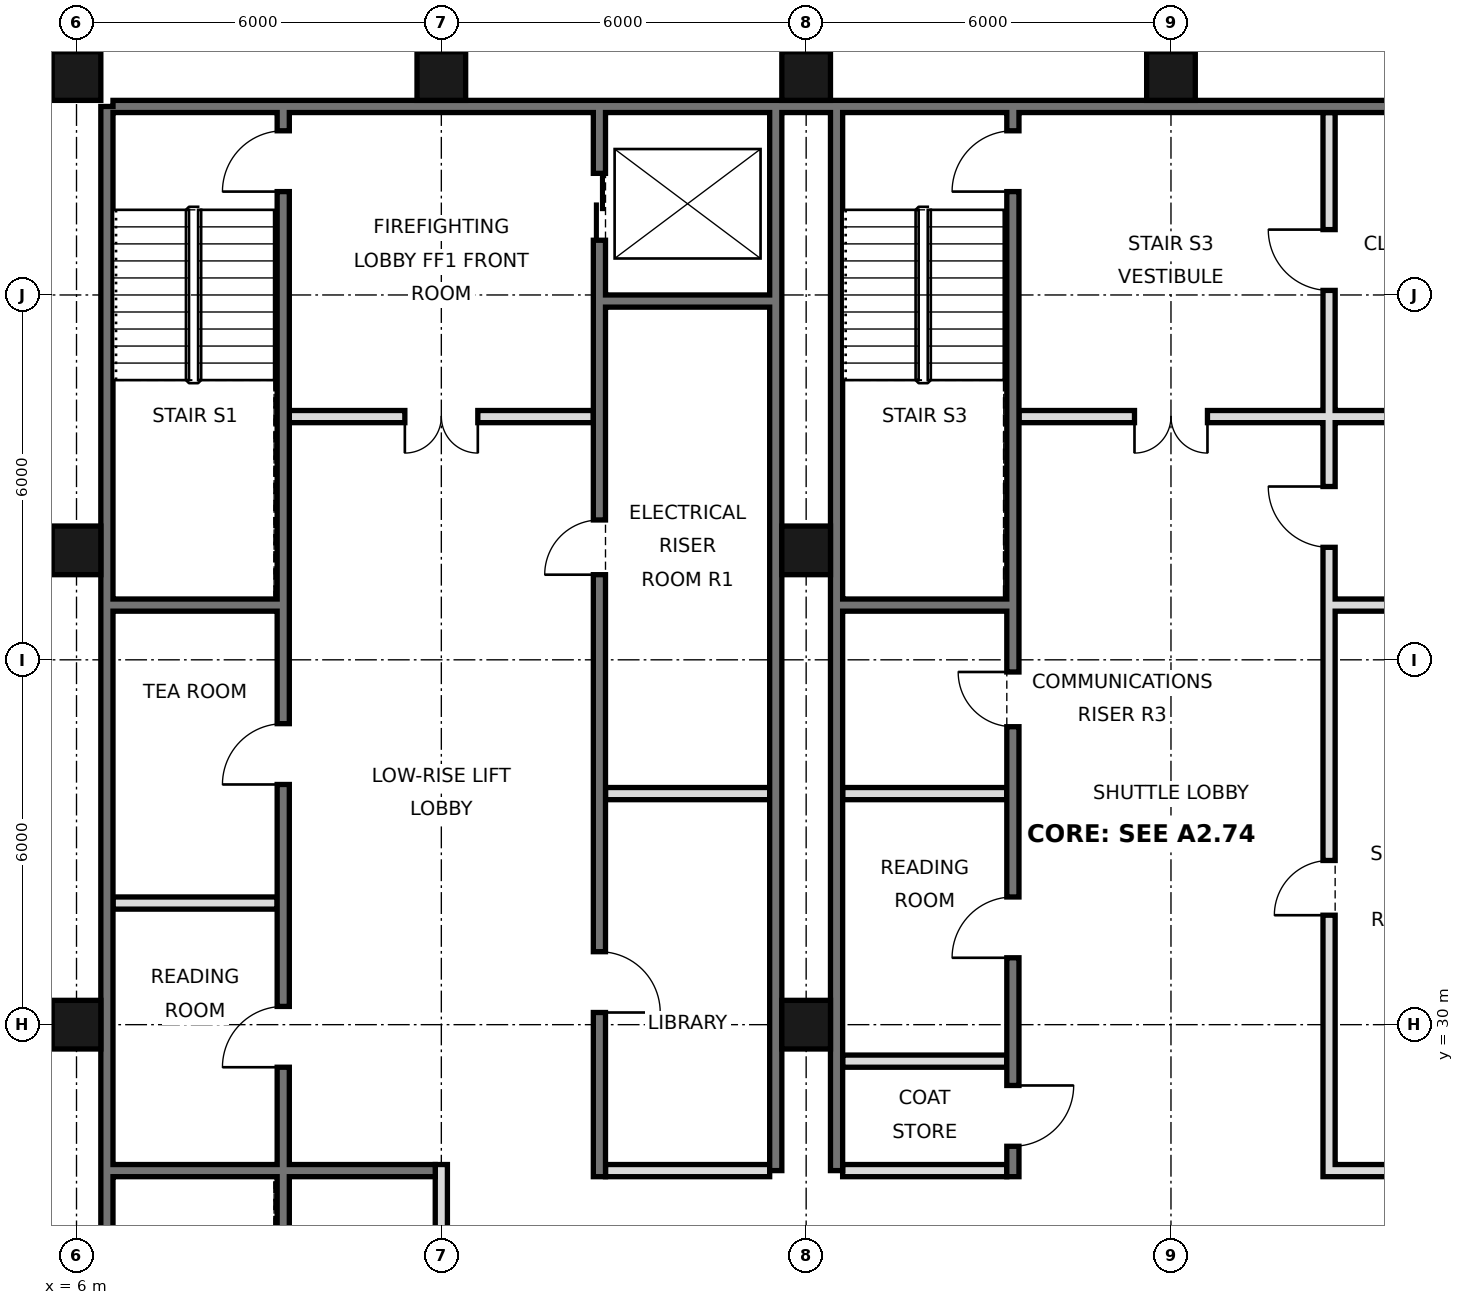
"""IFC4 building model, lengths in metres.
Left out: names, types, materials, properties, quantities, classifications, styles, units other than length and angle.
Written with IfcOpenShell. Run it as: python <this file> out.ifc"""

import sys

from ifc_helpers import new_model, si_unit, direction, frame, frame_2d, origin, origin_2d, place, context, subcontext, project, spatial, rectangle, hollow_rectangle, extrude, element, fill, save


model = new_model("IFC4")
c1 = context("Model", 3, precision=1e-05, world=origin(), true_north=direction((0.0, 1.0)))
c2 = subcontext(c1, "Body", "Model", "MODEL_VIEW")
j1 = project(units=[si_unit("LENGTHUNIT", "METRE"), si_unit("PLANEANGLEUNIT", "RADIAN")], contexts=[c1])
p1 = place(None, origin())
s1 = spatial("IfcSite", under=j1, at=p1, CompositionType="ELEMENT")
p2 = place(p1, origin())
s2 = spatial("IfcBuilding", under=s1, at=p2, CompositionType="ELEMENT")
p3 = place(p2, frame((0.0, 0.0, 298.0)))
s3 = spatial("IfcBuildingStorey", under=s2, at=p3, CompositionType="ELEMENT", Elevation=298.0)
for number, where, z_axis, x_axis in (
    (1, (6.0, 30.0, 0.0), (0.0, 0.0, 1.0), (1.0, 0.0, 0.0)),
    (2, (6.0, 37.8, 0.0), (0.0, 0.0, 1.0), (1.0, 0.0, 0.0)),
    (3, (6.0, 45.6, 0.0), (0.0, 0.0, 1.0), (1.0, 0.0, 0.0)),
    (4, (12.0, 45.6, 0.0), (0.0, 0.0, 1.0), (1.0, 0.0, 0.0)),
    (5, (18.0, 30.0, 0.0), (0.0, 0.0, 1.0), (1.0, 0.0, 0.0)),
    (6, (18.0, 37.8, 0.0), (0.0, 0.0, 1.0), (1.0, 0.0, 0.0)),
    (7, (18.0, 45.6, 0.0), (0.0, 0.0, 1.0), (1.0, 0.0, 0.0)),
    (8, (24.0, 45.6, 0.0), (0.0, 0.0, 1.0), (1.0, 0.0, 0.0)),
):
    element("IfcColumn", number, at=place(p3, frame(where, z_axis=z_axis, x_axis=x_axis)), inside=s3, PredefinedType="COLUMN", context=c2, shape_type="SweptSolid", body=[
        extrude(hollow_rectangle(XDim=0.8, YDim=0.8, WallThickness=0.032, at=origin_2d()), origin(), (0.0, 0.0, 1.0), 3.6),
    ])
p4 = place(p3, frame((6.5, 21.6, 0.0), z_axis=(0.0, 0.0, 1.0), x_axis=(0.0, 1.0, 0.0)))
e9 = element("IfcWall", 9, at=p4, inside=s3, PredefinedType="SOLIDWALL", context=c2, shape_type="SweptSolid", body=[
    extrude(rectangle(XDim=23.5, YDim=0.2, at=frame_2d((11.75, 0.0))), origin(), (0.0, 0.0, 1.0), 3.42),
])
p5 = place(p3, frame((6.6, 45.1, 0.0), z_axis=(0.0, 0.0, 1.0), x_axis=(1.0, 0.0, 0.0)))
e10 = element("IfcWall", 10, at=p5, inside=s3, PredefinedType="SOLIDWALL", context=c2, shape_type="SweptSolid", body=[
    extrude(rectangle(XDim=34.8, YDim=0.2, at=frame_2d((17.4, 0.0))), origin(), (0.0, 0.0, 1.0), 3.42),
])
for number, where, z_axis, x_axis in (
    (11, (17.5, 27.6, 0.0), (0.0, 0.0, 1.0), (0.0, 1.0, 0.0)),
    (12, (18.5, 27.6, 0.0), (0.0, 0.0, 1.0), (0.0, 1.0, 0.0)),
):
    element("IfcWall", number, at=place(p3, frame(where, z_axis=z_axis, x_axis=x_axis)), inside=s3, PredefinedType="SOLIDWALL", context=c2, shape_type="SweptSolid", body=[
        extrude(rectangle(XDim=17.5, YDim=0.2, at=frame_2d((8.75, 0.0))), origin(), (0.0, 0.0, 1.0), 3.42),
    ])
p6 = place(p3, frame((12.0, 21.6, 0.0), z_axis=(0.0, 0.0, 1.0), x_axis=(0.0, 1.0, 0.0)))
e13 = element("IfcWall", 13, at=p6, inside=s3, PredefinedType="PARTITIONING", context=c2, shape_type="SweptSolid", body=[
    extrude(rectangle(XDim=6.1, YDim=0.2, at=frame_2d((3.05, 0.0))), origin(), (0.0, 0.0, 1.0), 3.42),
])
p7 = place(p3, frame((14.6, 27.5, 0.0), z_axis=(0.0, 0.0, 1.0), x_axis=(0.0, 1.0, 0.0)))
e14 = element("IfcWall", 14, at=p7, inside=s3, PredefinedType="SOLIDWALL", context=c2, shape_type="SweptSolid", body=[
    extrude(rectangle(XDim=17.5, YDim=0.2, at=frame_2d((8.75, 0.0))), origin(), (0.0, 0.0, 1.0), 3.42),
])
p8 = place(p7, frame((15.4, 0.0, 0.0)))
e15 = element("IfcOpeningElement", 15, at=p8, cuts=e14, PredefinedType="OPENING", context=c2, shape_type="SweptSolid", body=[
    extrude(rectangle(XDim=1.1, YDim=2.1, at=frame_2d((0.55, 1.05))), frame((0.0, 0.11, 0.0), z_axis=(0.0, -1.0, 0.0), x_axis=(1.0, 0.0, 0.0)), (0.0, 0.0, 1.0), 0.22),
])
p9 = place(p7, frame((2.7, 0.0, 0.0)))
e16 = element("IfcOpeningElement", 16, at=p9, cuts=e14, PredefinedType="OPENING", context=c2, shape_type="SweptSolid", body=[
    extrude(rectangle(XDim=1.0, YDim=2.1, at=frame_2d((0.5, 1.05))), frame((0.0, 0.11, 0.0), z_axis=(0.0, -1.0, 0.0), x_axis=(1.0, 0.0, 0.0)), (0.0, 0.0, 1.0), 0.22),
])
p10 = place(p7, frame((9.9, 0.0, 0.0)))
e17 = element("IfcOpeningElement", 17, at=p10, cuts=e14, PredefinedType="OPENING", context=c2, shape_type="SweptSolid", body=[
    extrude(rectangle(XDim=0.9, YDim=2.1, at=frame_2d((0.45, 1.05))), frame((0.0, 0.11, 0.0), z_axis=(0.0, -1.0, 0.0), x_axis=(1.0, 0.0, 0.0)), (0.0, 0.0, 1.0), 0.22),
])
p11 = place(p3, frame((21.4, 27.5, 0.0), z_axis=(0.0, 0.0, 1.0), x_axis=(0.0, 1.0, 0.0)))
e18 = element("IfcWall", 18, at=p11, inside=s3, PredefinedType="SOLIDWALL", context=c2, shape_type="SweptSolid", body=[
    extrude(rectangle(XDim=17.5, YDim=0.2, at=frame_2d((8.75, 0.0))), origin(), (0.0, 0.0, 1.0), 3.42),
])
p12 = place(p11, frame((0.5, 0.0, 0.0)))
e19 = element("IfcOpeningElement", 19, at=p12, cuts=e18, PredefinedType="OPENING", context=c2, shape_type="SweptSolid", body=[
    extrude(rectangle(XDim=1.0, YDim=2.1, at=frame_2d((0.5, 1.05))), frame((0.0, 0.11, 0.0), z_axis=(0.0, -1.0, 0.0), x_axis=(1.0, 0.0, 0.0)), (0.0, 0.0, 1.0), 0.22),
])
p13 = place(p11, frame((3.6, 0.0, 0.0)))
e20 = element("IfcOpeningElement", 20, at=p13, cuts=e18, PredefinedType="OPENING", context=c2, shape_type="SweptSolid", body=[
    extrude(rectangle(XDim=1.0, YDim=2.1, at=frame_2d((0.5, 1.05))), frame((0.0, 0.11, 0.0), z_axis=(0.0, -1.0, 0.0), x_axis=(1.0, 0.0, 0.0)), (0.0, 0.0, 1.0), 0.22),
])
p14 = place(p11, frame((16.2, 0.0, 0.0)))
e21 = element("IfcOpeningElement", 21, at=p14, cuts=e18, PredefinedType="OPENING", context=c2, shape_type="SweptSolid", body=[
    extrude(rectangle(XDim=1.0, YDim=2.1, at=frame_2d((0.5, 1.05))), frame((0.0, 0.11, 0.0), z_axis=(0.0, -1.0, 0.0), x_axis=(1.0, 0.0, 0.0)), (0.0, 0.0, 1.0), 0.22),
])
p15 = place(p11, frame((7.4, 0.0, 0.0)))
e22 = element("IfcOpeningElement", 22, at=p15, cuts=e18, PredefinedType="OPENING", context=c2, shape_type="SweptSolid", body=[
    extrude(rectangle(XDim=0.9, YDim=2.1, at=frame_2d((0.45, 1.05))), frame((0.0, 0.11, 0.0), z_axis=(0.0, -1.0, 0.0), x_axis=(1.0, 0.0, 0.0)), (0.0, 0.0, 1.0), 0.22),
])
p16 = place(p3, frame((26.6, 27.5, 0.0), z_axis=(0.0, 0.0, 1.0), x_axis=(0.0, 1.0, 0.0)))
e23 = element("IfcWall", 23, at=p16, inside=s3, PredefinedType="SOLIDWALL", context=c2, shape_type="SweptSolid", body=[
    extrude(rectangle(XDim=17.5, YDim=0.2, at=frame_2d((8.75, 0.0))), origin(), (0.0, 0.0, 1.0), 3.42),
])
p17 = place(p16, frame((4.3, 0.0, 0.0)))
e24 = element("IfcOpeningElement", 24, at=p17, cuts=e23, PredefinedType="OPENING", context=c2, shape_type="SweptSolid", body=[
    extrude(rectangle(XDim=0.9, YDim=2.1, at=frame_2d((0.45, 1.05))), frame((0.0, 0.11, 0.0), z_axis=(0.0, -1.0, 0.0), x_axis=(1.0, 0.0, 0.0)), (0.0, 0.0, 1.0), 0.22),
])
p18 = place(p16, frame((10.35, 0.0, 0.0)))
e25 = element("IfcOpeningElement", 25, at=p18, cuts=e23, PredefinedType="OPENING", context=c2, shape_type="SweptSolid", body=[
    extrude(rectangle(XDim=1.0, YDim=2.1, at=frame_2d((0.5, 1.05))), frame((0.0, 0.11, 0.0), z_axis=(0.0, -1.0, 0.0), x_axis=(1.0, 0.0, 0.0)), (0.0, 0.0, 1.0), 0.22),
])
p19 = place(p16, frame((14.575, 0.0, 0.0)))
e26 = element("IfcOpeningElement", 26, at=p19, cuts=e23, PredefinedType="OPENING", context=c2, shape_type="SweptSolid", body=[
    extrude(rectangle(XDim=1.0, YDim=2.1, at=frame_2d((0.5, 1.05))), frame((0.0, 0.11, 0.0), z_axis=(0.0, -1.0, 0.0), x_axis=(1.0, 0.0, 0.0)), (0.0, 0.0, 1.0), 0.22),
])
p20 = place(p3, frame((9.4, 21.6, 0.0), z_axis=(0.0, 0.0, 1.0), x_axis=(0.0, 1.0, 0.0)))
e27 = element("IfcWall", 27, at=p20, inside=s3, PredefinedType="SOLIDWALL", context=c2, shape_type="SweptSolid", body=[
    extrude(rectangle(XDim=23.4, YDim=0.2, at=frame_2d((11.7, 0.0))), origin(), (0.0, 0.0, 1.0), 3.42),
])
p21 = place(p20, frame((7.7, 0.0, 0.0)))
e28 = element("IfcOpeningElement", 28, at=p21, cuts=e27, PredefinedType="OPENING", context=c2, shape_type="SweptSolid", body=[
    extrude(rectangle(XDim=1.0, YDim=2.1, at=frame_2d((0.5, 1.05))), frame((0.0, 0.11, 0.0), z_axis=(0.0, -1.0, 0.0), x_axis=(1.0, 0.0, 0.0)), (0.0, 0.0, 1.0), 0.22),
])
p22 = place(p20, frame((12.35, 0.0, 0.0)))
e29 = element("IfcOpeningElement", 29, at=p22, cuts=e27, PredefinedType="OPENING", context=c2, shape_type="SweptSolid", body=[
    extrude(rectangle(XDim=1.0, YDim=2.1, at=frame_2d((0.5, 1.05))), frame((0.0, 0.11, 0.0), z_axis=(0.0, -1.0, 0.0), x_axis=(1.0, 0.0, 0.0)), (0.0, 0.0, 1.0), 0.22),
])
p23 = place(p20, frame((22.1, 0.0, 0.0)))
e30 = element("IfcOpeningElement", 30, at=p23, cuts=e27, PredefinedType="OPENING", context=c2, shape_type="SweptSolid", body=[
    extrude(rectangle(XDim=1.0, YDim=2.1, at=frame_2d((0.5, 1.05))), frame((0.0, 0.11, 0.0), z_axis=(0.0, -1.0, 0.0), x_axis=(1.0, 0.0, 0.0)), (0.0, 0.0, 1.0), 0.22),
])
p24 = place(p20, frame((0.175, 0.0, 0.0)))
e31 = element("IfcOpeningElement", 31, at=p24, cuts=e27, PredefinedType="OPENING", context=c2, shape_type="SweptSolid", body=[
    extrude(rectangle(XDim=0.9, YDim=2.1, at=frame_2d((0.45, 1.05))), frame((0.0, 0.11, 0.0), z_axis=(0.0, -1.0, 0.0), x_axis=(1.0, 0.0, 0.0)), (0.0, 0.0, 1.0), 0.22),
])
for number, where, z_axis, x_axis in (
    (32, (14.7, 27.6, 0.0), (0.0, 0.0, 1.0), (1.0, 0.0, 0.0)),
    (33, (18.6, 27.6, 0.0), (0.0, 0.0, 1.0), (1.0, 0.0, 0.0)),
):
    element("IfcWall", number, at=place(p3, frame(where, z_axis=z_axis, x_axis=x_axis)), inside=s3, PredefinedType="PARTITIONING", context=c2, shape_type="SweptSolid", body=[
        extrude(rectangle(XDim=2.7, YDim=0.2, at=frame_2d((1.35, 0.0))), origin(), (0.0, 0.0, 1.0), 3.42),
    ])
p25 = place(p3, frame((26.7, 27.6, 0.0), z_axis=(0.0, 0.0, 1.0), x_axis=(1.0, 0.0, 0.0)))
e34 = element("IfcWall", 34, at=p25, inside=s3, PredefinedType="SOLIDWALL", context=c2, shape_type="SweptSolid", body=[
    extrude(rectangle(XDim=2.7, YDim=0.2, at=frame_2d((1.35, 0.0))), origin(), (0.0, 0.0, 1.0), 3.42),
])
p26 = place(p3, frame((6.6, 27.6, 0.0), z_axis=(0.0, 0.0, 1.0), x_axis=(1.0, 0.0, 0.0)))
e35 = element("IfcWall", 35, at=p26, inside=s3, PredefinedType="SOLIDWALL", context=c2, shape_type="SweptSolid", body=[
    extrude(rectangle(XDim=5.3, YDim=0.2, at=frame_2d((2.65, 0.0))), origin(), (0.0, 0.0, 1.0), 3.42),
])
for number, where, z_axis, x_axis in (
    (36, (18.6, 29.4, 0.0), (0.0, 0.0, 1.0), (1.0, 0.0, 0.0)),
    (37, (6.6, 32.0, 0.0), (0.0, 0.0, 1.0), (1.0, 0.0, 0.0)),
):
    element("IfcWall", number, at=place(p3, frame(where, z_axis=z_axis, x_axis=x_axis)), inside=s3, PredefinedType="PARTITIONING", context=c2, shape_type="SweptSolid", body=[
        extrude(rectangle(XDim=2.7, YDim=0.2, at=frame_2d((1.35, 0.0))), origin(), (0.0, 0.0, 1.0), 3.42),
    ])
for number, where, z_axis, x_axis in (
    (38, (14.7, 33.8, 0.0), (0.0, 0.0, 1.0), (1.0, 0.0, 0.0)),
    (39, (18.6, 33.8, 0.0), (0.0, 0.0, 1.0), (1.0, 0.0, 0.0)),
    (40, (18.6, 36.9, 0.0), (0.0, 0.0, 1.0), (1.0, 0.0, 0.0)),
    (41, (26.7, 36.9, 0.0), (0.0, 0.0, 1.0), (1.0, 0.0, 0.0)),
    (42, (6.6, 36.9, 0.0), (0.0, 0.0, 1.0), (1.0, 0.0, 0.0)),
):
    element("IfcWall", number, at=place(p3, frame(where, z_axis=z_axis, x_axis=x_axis)), inside=s3, PredefinedType="SOLIDWALL", context=c2, shape_type="SweptSolid", body=[
        extrude(rectangle(XDim=2.7, YDim=0.2, at=frame_2d((1.35, 0.0))), origin(), (0.0, 0.0, 1.0), 3.42),
    ])
p27 = place(p3, frame((21.5, 40.0, 0.0), z_axis=(0.0, 0.0, 1.0), x_axis=(1.0, 0.0, 0.0)))
e43 = element("IfcWall", 43, at=p27, inside=s3, PredefinedType="PARTITIONING", context=c2, shape_type="SweptSolid", body=[
    extrude(rectangle(XDim=7.9, YDim=0.2, at=frame_2d((3.95, 0.0))), origin(), (0.0, 0.0, 1.0), 3.42),
])
p28 = place(p27, frame((1.9, 0.0, 0.0)))
e44 = element("IfcOpeningElement", 44, at=p28, cuts=e43, PredefinedType="OPENING", context=c2, shape_type="SweptSolid", body=[
    extrude(rectangle(XDim=1.2, YDim=2.1, at=frame_2d((0.6, 1.05))), frame((0.0, 0.11, 0.0), z_axis=(0.0, -1.0, 0.0), x_axis=(1.0, 0.0, 0.0)), (0.0, 0.0, 1.0), 0.22),
])
p29 = place(p3, frame((9.5, 40.0, 0.0), z_axis=(0.0, 0.0, 1.0), x_axis=(1.0, 0.0, 0.0)))
e45 = element("IfcWall", 45, at=p29, inside=s3, PredefinedType="PARTITIONING", context=c2, shape_type="SweptSolid", body=[
    extrude(rectangle(XDim=5.0, YDim=0.2, at=frame_2d((2.5, 0.0))), origin(), (0.0, 0.0, 1.0), 3.42),
])
p30 = place(p29, frame((1.9, 0.0, 0.0)))
e46 = element("IfcOpeningElement", 46, at=p30, cuts=e45, PredefinedType="OPENING", context=c2, shape_type="SweptSolid", body=[
    extrude(rectangle(XDim=1.2, YDim=2.1, at=frame_2d((0.6, 1.05))), frame((0.0, 0.11, 0.0), z_axis=(0.0, -1.0, 0.0), x_axis=(1.0, 0.0, 0.0)), (0.0, 0.0, 1.0), 0.22),
])
p31 = place(p3, frame((14.7, 41.9, 0.0), z_axis=(0.0, 0.0, 1.0), x_axis=(1.0, 0.0, 0.0)))
e47 = element("IfcWall", 47, at=p31, inside=s3, PredefinedType="SOLIDWALL", context=c2, shape_type="SweptSolid", body=[
    extrude(rectangle(XDim=2.7, YDim=0.2, at=frame_2d((1.35, 0.0))), origin(), (0.0, 0.0, 1.0), 3.42),
])
p32 = place(p30, frame((1.2, 0.0, 0.0), z_axis=(0.0, 0.0, 1.0), x_axis=(-1.0, 0.0, 0.0)))
e48 = element("IfcDoor", 48, at=p32, inside=s3, OperationType="DOUBLE_DOOR_SINGLE_SWING", PredefinedType="DOOR", context=c2, shape_type="SweptSolid", body=[
    extrude(rectangle(XDim=1.2, YDim=2.1, at=frame_2d((0.6, 1.05))), frame((0.0, 0.025, 0.0), z_axis=(0.0, -1.0, 0.0), x_axis=(1.0, 0.0, 0.0)), (0.0, 0.0, 1.0), 0.05),
])
fill(e46, e48)
p33 = place(p28, frame((1.2, 0.0, 0.0), z_axis=(0.0, 0.0, 1.0), x_axis=(-1.0, 0.0, 0.0)))
e49 = element("IfcDoor", 49, at=p33, inside=s3, OperationType="DOUBLE_DOOR_SINGLE_SWING", PredefinedType="DOOR", context=c2, shape_type="SweptSolid", body=[
    extrude(rectangle(XDim=1.2, YDim=2.1, at=frame_2d((0.6, 1.05))), frame((0.0, 0.025, 0.0), z_axis=(0.0, -1.0, 0.0), x_axis=(1.0, 0.0, 0.0)), (0.0, 0.0, 1.0), 0.05),
])
fill(e44, e49)
p34 = place(p8, origin())
e50 = element("IfcDoor", 50, at=p34, inside=s3, OperationType="DOUBLE_DOOR_SLIDING", PredefinedType="DOOR", context=c2, shape_type="SweptSolid", body=[
    extrude(rectangle(XDim=1.1, YDim=2.1, at=frame_2d((0.55, 1.05))), frame((0.0, 0.025, 0.0), z_axis=(0.0, -1.0, 0.0), x_axis=(1.0, 0.0, 0.0)), (0.0, 0.0, 1.0), 0.05),
])
fill(e15, e50)
p35 = place(p12, origin())
e51 = element("IfcDoor", 51, at=p35, inside=s3, OperationType="SINGLE_SWING_RIGHT", PredefinedType="DOOR", context=c2, shape_type="SweptSolid", body=[
    extrude(rectangle(XDim=1.0, YDim=2.1, at=frame_2d((0.5, 1.05))), frame((0.0, 0.025, 0.0), z_axis=(0.0, -1.0, 0.0), x_axis=(1.0, 0.0, 0.0)), (0.0, 0.0, 1.0), 0.05),
])
fill(e19, e51)
p36 = place(p13, origin())
e52 = element("IfcDoor", 52, at=p36, inside=s3, OperationType="SINGLE_SWING_LEFT", PredefinedType="DOOR", context=c2, shape_type="SweptSolid", body=[
    extrude(rectangle(XDim=1.0, YDim=2.1, at=frame_2d((0.5, 1.05))), frame((0.0, 0.025, 0.0), z_axis=(0.0, -1.0, 0.0), x_axis=(1.0, 0.0, 0.0)), (0.0, 0.0, 1.0), 0.05),
])
fill(e20, e52)
p37 = place(p9, frame((1.0, 0.0, 0.0), z_axis=(0.0, 0.0, 1.0), x_axis=(-1.0, 0.0, 0.0)))
e53 = element("IfcDoor", 53, at=p37, inside=s3, OperationType="SINGLE_SWING_RIGHT", PredefinedType="DOOR", context=c2, shape_type="SweptSolid", body=[
    extrude(rectangle(XDim=1.0, YDim=2.1, at=frame_2d((0.5, 1.05))), frame((0.0, 0.025, 0.0), z_axis=(0.0, -1.0, 0.0), x_axis=(1.0, 0.0, 0.0)), (0.0, 0.0, 1.0), 0.05),
])
fill(e16, e53)
p38 = place(p21, origin())
e54 = element("IfcDoor", 54, at=p38, inside=s3, OperationType="SINGLE_SWING_LEFT", PredefinedType="DOOR", context=c2, shape_type="SweptSolid", body=[
    extrude(rectangle(XDim=1.0, YDim=2.1, at=frame_2d((0.5, 1.05))), frame((0.0, 0.025, 0.0), z_axis=(0.0, -1.0, 0.0), x_axis=(1.0, 0.0, 0.0)), (0.0, 0.0, 1.0), 0.05),
])
fill(e28, e54)
p39 = place(p22, origin())
e55 = element("IfcDoor", 55, at=p39, inside=s3, OperationType="SINGLE_SWING_LEFT", PredefinedType="DOOR", context=c2, shape_type="SweptSolid", body=[
    extrude(rectangle(XDim=1.0, YDim=2.1, at=frame_2d((0.5, 1.05))), frame((0.0, 0.025, 0.0), z_axis=(0.0, -1.0, 0.0), x_axis=(1.0, 0.0, 0.0)), (0.0, 0.0, 1.0), 0.05),
])
fill(e29, e55)
p40 = place(p23, origin())
e56 = element("IfcDoor", 56, at=p40, inside=s3, OperationType="SINGLE_SWING_LEFT", PredefinedType="DOOR", context=c2, shape_type="SweptSolid", body=[
    extrude(rectangle(XDim=1.0, YDim=2.1, at=frame_2d((0.5, 1.05))), frame((0.0, 0.025, 0.0), z_axis=(0.0, -1.0, 0.0), x_axis=(1.0, 0.0, 0.0)), (0.0, 0.0, 1.0), 0.05),
])
fill(e30, e56)
p41 = place(p14, origin())
e57 = element("IfcDoor", 57, at=p41, inside=s3, OperationType="SINGLE_SWING_LEFT", PredefinedType="DOOR", context=c2, shape_type="SweptSolid", body=[
    extrude(rectangle(XDim=1.0, YDim=2.1, at=frame_2d((0.5, 1.05))), frame((0.0, 0.025, 0.0), z_axis=(0.0, -1.0, 0.0), x_axis=(1.0, 0.0, 0.0)), (0.0, 0.0, 1.0), 0.05),
])
fill(e21, e57)
p42 = place(p10, origin())
e58 = element("IfcDoor", 58, at=p42, inside=s3, OperationType="SINGLE_SWING_LEFT", PredefinedType="DOOR", context=c2, shape_type="SweptSolid", body=[
    extrude(rectangle(XDim=0.9, YDim=2.1, at=frame_2d((0.45, 1.05))), frame((0.0, 0.025, 0.0), z_axis=(0.0, -1.0, 0.0), x_axis=(1.0, 0.0, 0.0)), (0.0, 0.0, 1.0), 0.05),
])
fill(e17, e58)
p43 = place(p15, frame((0.9, 0.0, 0.0), z_axis=(0.0, 0.0, 1.0), x_axis=(-1.0, 0.0, 0.0)))
e59 = element("IfcDoor", 59, at=p43, inside=s3, OperationType="SINGLE_SWING_LEFT", PredefinedType="DOOR", context=c2, shape_type="SweptSolid", body=[
    extrude(rectangle(XDim=0.9, YDim=2.1, at=frame_2d((0.45, 1.05))), frame((0.0, 0.025, 0.0), z_axis=(0.0, -1.0, 0.0), x_axis=(1.0, 0.0, 0.0)), (0.0, 0.0, 1.0), 0.05),
])
fill(e22, e59)
p44 = place(p17, origin())
e60 = element("IfcDoor", 60, at=p44, inside=s3, OperationType="SINGLE_SWING_LEFT", PredefinedType="DOOR", context=c2, shape_type="SweptSolid", body=[
    extrude(rectangle(XDim=0.9, YDim=2.1, at=frame_2d((0.45, 1.05))), frame((0.0, 0.025, 0.0), z_axis=(0.0, -1.0, 0.0), x_axis=(1.0, 0.0, 0.0)), (0.0, 0.0, 1.0), 0.05),
])
fill(e24, e60)
p45 = place(p18, frame((1.0, 0.0, 0.0), z_axis=(0.0, 0.0, 1.0), x_axis=(-1.0, 0.0, 0.0)))
e61 = element("IfcDoor", 61, at=p45, inside=s3, OperationType="SINGLE_SWING_LEFT", PredefinedType="DOOR", context=c2, shape_type="SweptSolid", body=[
    extrude(rectangle(XDim=1.0, YDim=2.1, at=frame_2d((0.5, 1.05))), frame((0.0, 0.025, 0.0), z_axis=(0.0, -1.0, 0.0), x_axis=(1.0, 0.0, 0.0)), (0.0, 0.0, 1.0), 0.05),
])
fill(e25, e61)
p46 = place(p19, frame((1.0, 0.0, 0.0), z_axis=(0.0, 0.0, 1.0), x_axis=(-1.0, 0.0, 0.0)))
e62 = element("IfcDoor", 62, at=p46, inside=s3, OperationType="SINGLE_SWING_LEFT", PredefinedType="DOOR", context=c2, shape_type="SweptSolid", body=[
    extrude(rectangle(XDim=1.0, YDim=2.1, at=frame_2d((0.5, 1.05))), frame((0.0, 0.025, 0.0), z_axis=(0.0, -1.0, 0.0), x_axis=(1.0, 0.0, 0.0)), (0.0, 0.0, 1.0), 0.05),
])
fill(e26, e62)
save(model, sys.argv[1])
